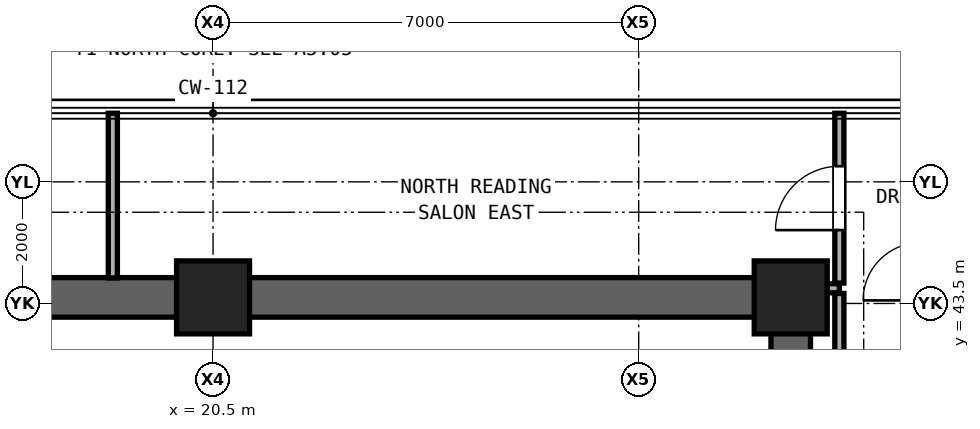
"""IFC4 building model, lengths in metres.
Left out: names, types, materials, properties, quantities, classifications, styles, units other than length and angle.
Written with IfcOpenShell. Run it as: python <this file> out.ifc"""

import sys

from ifc_helpers import new_model, si_unit, direction, frame, frame_2d, origin, origin_2d, place, context, subcontext, project, spatial, rectangle, extrude, element, fill, save


model = new_model("IFC4")
c1 = context("Model", 3, precision=1e-05, world=origin(), true_north=direction((0.0, 1.0)))
c2 = subcontext(c1, "Body", "Model", "MODEL_VIEW")
j1 = project(units=[si_unit("LENGTHUNIT", "METRE"), si_unit("PLANEANGLEUNIT", "RADIAN")], contexts=[c1])
p1 = place(None, origin())
s1 = spatial("IfcSite", under=j1, at=p1, CompositionType="ELEMENT")
p2 = place(p1, origin())
s2 = spatial("IfcBuilding", under=s1, at=p2, CompositionType="ELEMENT")
p3 = place(p2, frame((0.0, 0.0, 91.7)))
s3 = spatial("IfcBuildingStorey", under=s2, at=p3, CompositionType="ELEMENT", Elevation=91.7)
for number, where, z_axis, x_axis in (
    (1, (20.5, 43.6, 0.0), (0.0, 0.0, 1.0), (1.0, 0.0, 0.0)),
    (2, (30.0, 43.6, 0.0), (0.0, 0.0, 1.0), (1.0, 0.0, 0.0)),
):
    element("IfcColumn", number, at=place(p3, frame(where, z_axis=z_axis, x_axis=x_axis)), inside=s3, PredefinedType="COLUMN", context=c2, shape_type="SweptSolid", body=[
        extrude(rectangle(XDim=1.2, YDim=1.2, at=origin_2d()), origin(), (0.0, 0.0, 1.0), 3.3),
    ])
p4 = place(p3, frame((11.0, 43.6, 0.0), z_axis=(0.0, 0.0, 1.0), x_axis=(1.0, 0.0, 0.0)))
e3 = element("IfcWall", 3, at=p4, inside=s3, PredefinedType="SHEAR", context=c2, shape_type="SweptSolid", body=[
    extrude(rectangle(XDim=19.0, YDim=0.65, at=frame_2d((9.5, 0.0))), origin(), (0.0, 0.0, 1.0), 3.08),
])
p5 = place(p3, frame((30.0, 37.6, 0.0), z_axis=(0.0, 0.0, 1.0), x_axis=(0.0, 1.0, 0.0)))
e4 = element("IfcWall", 4, at=p5, inside=s3, PredefinedType="SHEAR", context=c2, shape_type="SweptSolid", body=[
    extrude(rectangle(XDim=6.0, YDim=0.65, at=frame_2d((3.0, 0.0))), origin(), (0.0, 0.0, 1.0), 3.08),
])
p6 = place(p3, frame((30.32, 43.75, 0.0), z_axis=(0.0, 0.0, 1.0), x_axis=(1.0, 0.0, 0.0)))
e5 = element("IfcWall", 5, at=p6, inside=s3, PredefinedType="PARTITIONING", context=c2, shape_type="SweptSolid", body=[
    extrude(rectangle(XDim=0.48, YDim=0.15, at=frame_2d((0.24, 0.0))), origin(), (0.0, 0.0, 1.0), 3.08),
])
p7 = place(p3, frame((18.852, 43.92, 0.0), z_axis=(0.0, 0.0, 1.0), x_axis=(0.0, 1.0, 0.0)))
e6 = element("IfcWall", 6, at=p7, inside=s3, PredefinedType="PARTITIONING", context=c2, shape_type="SweptSolid", body=[
    extrude(rectangle(XDim=2.708, YDim=0.15, at=frame_2d((1.354, 0.0))), origin(), (0.0, 0.0, 1.0), 3.08),
])
p8 = place(p3, frame((30.8, 34.57, 0.0), z_axis=(0.0, 0.0, 1.0), x_axis=(0.0, 1.0, 0.0)))
e7 = element("IfcWall", 7, at=p8, inside=s3, PredefinedType="PARTITIONING", context=c2, shape_type="SweptSolid", body=[
    extrude(rectangle(XDim=9.095, YDim=0.15, at=frame_2d((4.547, 0.0))), origin(), (0.0, 0.0, 1.0), 2.456),
])
p9 = place(p3, frame((30.8, 43.835, 0.0), z_axis=(0.0, 0.0, 1.0), x_axis=(0.0, 1.0, 0.0)))
e8 = element("IfcWall", 8, at=p9, inside=s3, PredefinedType="PARTITIONING", context=c2, shape_type="SweptSolid", body=[
    extrude(rectangle(XDim=2.793, YDim=0.15, at=frame_2d((1.396, 0.0))), origin(), (0.0, 0.0, 1.0), 3.08),
])
p10 = place(p9, frame((0.872, 0.0, 0.0)))
e9 = element("IfcOpeningElement", 9, at=p10, cuts=e8, PredefinedType="OPENING", context=c2, shape_type="SweptSolid", body=[
    extrude(rectangle(XDim=1.05, YDim=2.2, at=frame_2d((0.525, 1.1))), frame((0.0, 0.085, 0.0), z_axis=(0.0, -1.0, 0.0), x_axis=(1.0, 0.0, 0.0)), (0.0, 0.0, 1.0), 0.17),
])
p11 = place(p10, origin())
e10 = element("IfcDoor", 10, at=p11, inside=s3, OperationType="SINGLE_SWING_LEFT", PredefinedType="DOOR", context=c2, shape_type="SweptSolid", body=[
    extrude(rectangle(XDim=1.05, YDim=2.2, at=frame_2d((0.525, 1.1))), frame((0.0, 0.025, 0.0), z_axis=(0.0, -1.0, 0.0), x_axis=(1.0, 0.0, 0.0)), (0.0, 0.0, 1.0), 0.05),
])
fill(e9, e10)
save(model, sys.argv[1])
